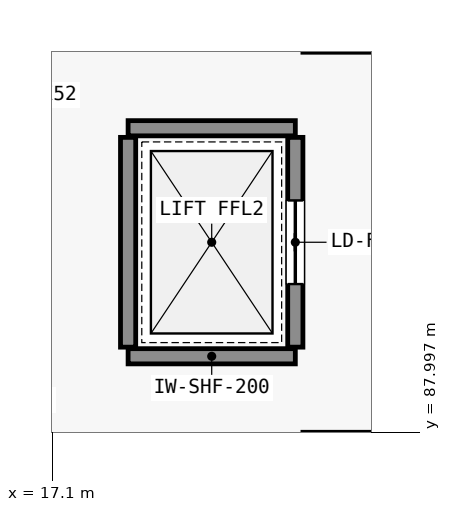
"""IFC4 building model, lengths in metres.
Left out: names, types, materials, properties, quantities, classifications, styles, units other than length and angle.
Written with IfcOpenShell. Run it as: python <this file> out.ifc"""

import sys

from ifc_helpers import new_model, si_unit, direction, frame, frame_2d, origin, place, context, subcontext, project, spatial, rectangle, extrude, element, fill, save


model = new_model("IFC4")
c1 = context("Model", 3, precision=1e-05, world=origin(), true_north=direction((0.0, 1.0)))
c2 = subcontext(c1, "Body", "Model", "MODEL_VIEW")
j1 = project(units=[si_unit("LENGTHUNIT", "METRE"), si_unit("PLANEANGLEUNIT", "RADIAN")], contexts=[c1])
p1 = place(None, origin())
s1 = spatial("IfcSite", under=j1, at=p1, CompositionType="ELEMENT")
p2 = place(p1, origin())
s2 = spatial("IfcBuilding", under=s1, at=p2, CompositionType="ELEMENT")
p3 = place(p2, frame((0.0, 0.0, 26.4)))
s3 = spatial("IfcBuildingStorey", under=s2, at=p3, CompositionType="ELEMENT", Elevation=26.4)
for number, where, z_axis, x_axis in (
    (1, (18.1, 89.0, 0.0), (0.0, 0.0, 1.0), (1.0, 0.0, 0.0)),
    (2, (18.1, 92.0, 0.0), (0.0, 0.0, 1.0), (1.0, 0.0, 0.0)),
):
    element("IfcWall", number, at=place(p3, frame(where, z_axis=z_axis, x_axis=x_axis)), inside=s3, PredefinedType="STANDARD", context=c2, shape_type="SweptSolid", body=[
        extrude(rectangle(XDim=2.2, YDim=0.2, at=frame_2d((1.1, 0.0))), origin(), (0.0, 0.0, 1.0), 5.18),
    ])
p4 = place(p3, frame((18.1, 89.12, 0.0), z_axis=(0.0, 0.0, 1.0), x_axis=(0.0, 1.0, 0.0)))
e3 = element("IfcWall", 3, at=p4, inside=s3, PredefinedType="STANDARD", context=c2, shape_type="SweptSolid", body=[
    extrude(rectangle(XDim=2.76, YDim=0.2, at=frame_2d((1.38, 0.0))), origin(), (0.0, 0.0, 1.0), 5.18),
])
p5 = place(p3, frame((20.3, 89.12, 0.0), z_axis=(0.0, 0.0, 1.0), x_axis=(0.0, 1.0, 0.0)))
e4 = element("IfcWall", 4, at=p5, inside=s3, PredefinedType="STANDARD", context=c2, shape_type="SweptSolid", body=[
    extrude(rectangle(XDim=2.76, YDim=0.2, at=frame_2d((1.38, 0.0))), origin(), (0.0, 0.0, 1.0), 5.18),
])
p6 = place(p5, frame((0.83, 0.0, 0.0)))
e5 = element("IfcOpeningElement", 5, at=p6, cuts=e4, PredefinedType="OPENING", context=c2, shape_type="SweptSolid", body=[
    extrude(rectangle(XDim=1.1, YDim=2.15, at=frame_2d((0.55, 1.075))), frame((0.0, 0.11, 0.0), z_axis=(0.0, -1.0, 0.0), x_axis=(1.0, 0.0, 0.0)), (0.0, 0.0, 1.0), 0.22),
])
p7 = place(p6, origin())
e6 = element("IfcDoor", 6, at=p7, inside=s3, OperationType="SLIDING_TO_LEFT", PredefinedType="DOOR", context=c2, shape_type="SweptSolid", body=[
    extrude(rectangle(XDim=1.1, YDim=2.15, at=frame_2d((0.55, 1.075))), frame((0.0, 0.025, 0.0), z_axis=(0.0, -1.0, 0.0), x_axis=(1.0, 0.0, 0.0)), (0.0, 0.0, 1.0), 0.05),
])
fill(e5, e6)
save(model, sys.argv[1])
